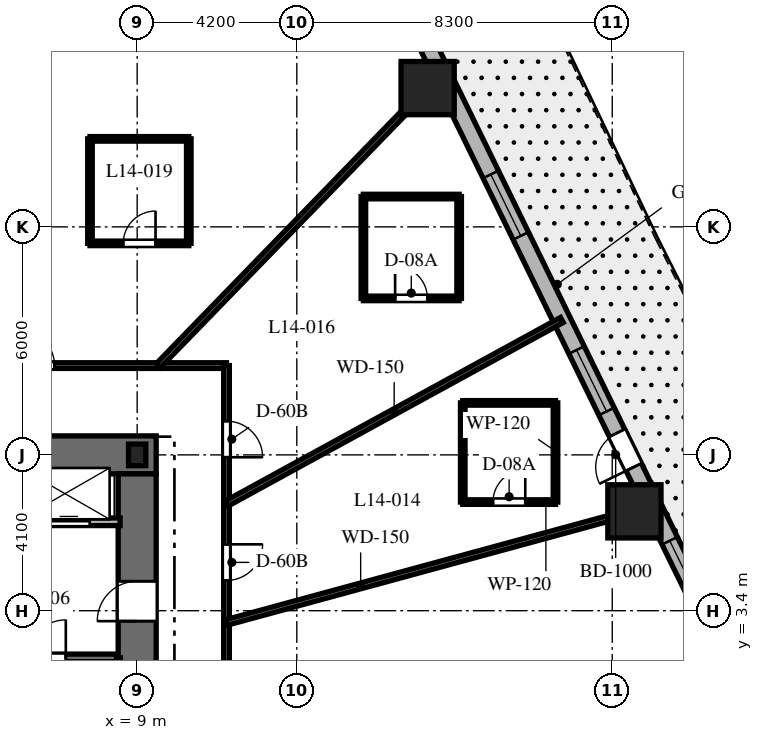
"""IFC4 building model, lengths in metres.
Left out: names, types, materials, properties, quantities, classifications, styles, units other than length and angle.
Written with IfcOpenShell. Run it as: python <this file> out.ifc"""

import sys

from ifc_helpers import new_model, si_unit, direction, frame, frame_2d, origin, origin_2d, place, context, subcontext, project, spatial, rectangle, i_section, extrude, element, fill, save


model = new_model("IFC4")
c1 = context("Model", 3, precision=1e-05, world=origin(), true_north=direction((0.0, 1.0)))
c2 = subcontext(c1, "Body", "Model", "MODEL_VIEW")
j1 = project(units=[si_unit("LENGTHUNIT", "METRE"), si_unit("PLANEANGLEUNIT", "RADIAN")], contexts=[c1])
p1 = place(None, origin())
s1 = spatial("IfcSite", under=j1, at=p1, CompositionType="ELEMENT")
p2 = place(p1, origin())
s2 = spatial("IfcBuilding", under=s1, at=p2, CompositionType="ELEMENT")
p3 = place(p2, frame((0.0, 0.0, 63.8)))
s3 = spatial("IfcBuildingStorey", under=s2, at=p3, CompositionType="ELEMENT", Elevation=63.8)
p4 = place(p3, frame((1.85, 7.5, 0.0), z_axis=(0.0, 0.0, 1.0), x_axis=(1.0, 0.0, 0.0)))
e1 = element("IfcWall", 1, at=p4, inside=s3, PredefinedType="SHEAR", context=c2, shape_type="SweptSolid", body=[
    extrude(rectangle(XDim=7.65, YDim=1.0, at=frame_2d((3.825, 0.0))), origin(), (0.0, 0.0, 1.0), 3.7),
])
p5 = place(p3, frame((9.0, -7.0, 0.0), z_axis=(0.0, 0.0, 1.0), x_axis=(0.0, 1.0, 0.0)))
e2 = element("IfcWall", 2, at=p5, inside=s3, PredefinedType="SHEAR", context=c2, shape_type="SweptSolid", body=[
    extrude(rectangle(XDim=14.0, YDim=1.0, at=frame_2d((7.0, 0.0))), origin(), (0.0, 0.0, 1.0), 3.7),
])
p6 = place(p5, frame((10.125, 0.0, 0.0)))
e3 = element("IfcOpeningElement", 3, at=p6, cuts=e2, PredefinedType="OPENING", context=c2, shape_type="SweptSolid", body=[
    extrude(rectangle(XDim=1.05, YDim=2.15, at=frame_2d((0.525, 1.075))), frame((0.0, 0.51, 0.0), z_axis=(0.0, -1.0, 0.0), x_axis=(1.0, 0.0, 0.0)), (0.0, 0.0, 1.0), 1.02),
])
p7 = place(p3, frame((8.458, -6.985, 0.0), z_axis=(0.0, 0.0, 1.0), x_axis=(0.0, 1.0, 0.0)))
e4 = element("IfcWall", 4, at=p7, inside=s3, PredefinedType="SHEAR", context=c2, shape_type="SweptSolid", body=[
    extrude(rectangle(XDim=9.143, YDim=0.2, at=frame_2d((4.572, 0.0))), origin(), (0.0, 0.0, 1.0), 3.7),
])
p8 = place(p3, frame((4.772, 2.158, 0.0), z_axis=(0.0, 0.0, 1.0), x_axis=(1.0, 0.0, 0.0)))
e5 = element("IfcWall", 5, at=p8, inside=s3, PredefinedType="SHEAR", context=c2, shape_type="SweptSolid", body=[
    extrude(rectangle(XDim=3.686, YDim=0.2, at=frame_2d((1.843, 0.0))), origin(), (0.0, 0.0, 1.0), 3.7),
])
p9 = place(p8, frame((1.35, 0.0, 0.0)))
e6 = element("IfcOpeningElement", 6, at=p9, cuts=e5, PredefinedType="OPENING", context=c2, shape_type="SweptSolid", body=[
    extrude(rectangle(XDim=1.0, YDim=2.15, at=frame_2d((0.5, 1.075))), frame((0.0, 0.11, 0.0), z_axis=(0.0, -1.0, 0.0), x_axis=(1.0, 0.0, 0.0)), (0.0, 0.0, 1.0), 0.22),
])
p10 = place(p3, frame((9.0, 7.5, 0.0), z_axis=(0.0, 0.0, 1.0), x_axis=(1.0, 0.0, 0.0)))
e7 = element("IfcColumn", 7, at=p10, inside=s3, PredefinedType="COLUMN", context=c2, shape_type="SweptSolid", body=[
    extrude(i_section(OverallWidth=0.454, OverallDepth=0.569, WebThickness=0.078, FlangeThickness=0.125, at=origin_2d()), origin(), (0.0, 0.0, 1.0), 3.7),
])
for number, where, z_axis, x_axis in (
    (8, (22.084, 6.014, 0.0), (0.0, 0.0, 1.0), (1.0, 0.0, 0.0)),
    (9, (16.643, 17.152, 0.0), (0.0, 0.0, 1.0), (1.0, 0.0, 0.0)),
):
    element("IfcColumn", number, at=place(p3, frame(where, z_axis=z_axis, x_axis=x_axis)), inside=s3, PredefinedType="COLUMN", context=c2, shape_type="SweptSolid", body=[
        extrude(rectangle(XDim=1.4, YDim=1.4, at=origin_2d()), origin(), (0.0, 0.0, 1.0), 3.7),
    ])
p11 = place(p3, frame((24.336, 2.532, 0.0), z_axis=(0.0, 0.0, 1.0), x_axis=(-0.438931326393, 0.898520612291, 0.0)))
e10 = element("IfcWall", 10, at=p11, inside=s3, PredefinedType="SOLIDWALL", context=c2, shape_type="SweptSolid", body=[
    extrude(rectangle(XDim=20.623, YDim=0.45, at=frame_2d((10.312, 0.0))), origin(), (0.0, 0.0, 1.0), 3.4),
])
p12 = place(p11, frame((5.171, 0.0, 0.0)))
e11 = element("IfcOpeningElement", 11, at=p12, cuts=e10, PredefinedType="OPENING", context=c2, shape_type="SweptSolid", body=[
    extrude(rectangle(XDim=1.0, YDim=2.15, at=frame_2d((0.5, 1.075))), frame((0.0, 0.235, 0.0), z_axis=(0.0, -1.0, 0.0), x_axis=(1.0, 0.0, 0.0)), (0.0, 0.0, 1.0), 0.47),
])
p13 = place(p11, frame((6.8, 0.0, 0.8)))
e12 = element("IfcOpeningElement", 12, at=p13, cuts=e10, PredefinedType="OPENING", context=c2, shape_type="SweptSolid", body=[
    extrude(rectangle(XDim=1.8, YDim=1.8, at=frame_2d((0.9, 0.9))), frame((0.0, 0.235, 0.0), z_axis=(0.0, -1.0, 0.0), x_axis=(1.0, 0.0, 0.0)), (0.0, 0.0, 1.0), 0.47),
])
p14 = place(p11, frame((11.942, 0.0, 0.8)))
e13 = element("IfcOpeningElement", 13, at=p14, cuts=e10, PredefinedType="OPENING", context=c2, shape_type="SweptSolid", body=[
    extrude(rectangle(XDim=1.8, YDim=1.8, at=frame_2d((0.9, 0.9))), frame((0.0, 0.235, 0.0), z_axis=(0.0, -1.0, 0.0), x_axis=(1.0, 0.0, 0.0)), (0.0, 0.0, 1.0), 0.47),
])
p15 = place(p11, frame((17.66, 0.0, 0.8)))
e14 = element("IfcOpeningElement", 14, at=p15, cuts=e10, PredefinedType="OPENING", context=c2, shape_type="SweptSolid", body=[
    extrude(rectangle(XDim=1.8, YDim=1.8, at=frame_2d((0.9, 0.9))), frame((0.0, 0.235, 0.0), z_axis=(0.0, -1.0, 0.0), x_axis=(1.0, 0.0, 0.0)), (0.0, 0.0, 1.0), 0.47),
])
p16 = place(p11, frame((1.214, 0.0, 0.8)))
e15 = element("IfcOpeningElement", 15, at=p16, cuts=e10, PredefinedType="OPENING", context=c2, shape_type="SweptSolid", body=[
    extrude(rectangle(XDim=1.8, YDim=1.8, at=frame_2d((0.9, 0.9))), frame((0.0, 0.235, 0.0), z_axis=(0.0, -1.0, 0.0), x_axis=(1.0, 0.0, 0.0)), (0.0, 0.0, 1.0), 0.47),
])
p17 = place(p3, frame((4.5, 5.74, 0.0), z_axis=(0.0, 0.0, 1.0), x_axis=(1.0, 0.0, 0.0)))
e16 = element("IfcWall", 16, at=p17, inside=s3, PredefinedType="PARTITIONING", context=c2, shape_type="SweptSolid", body=[
    extrude(rectangle(XDim=4.05, YDim=0.2, at=frame_2d((2.025, 0.0))), origin(), (0.0, 0.0, 1.0), 3.4),
])
p18 = place(p17, frame((0.3, 0.0, 0.0)))
e17 = element("IfcOpeningElement", 17, at=p18, cuts=e16, PredefinedType="OPENING", context=c2, shape_type="SweptSolid", body=[
    extrude(rectangle(XDim=0.85, YDim=2.03, at=frame_2d((0.425, 1.015))), frame((0.0, 0.11, 0.0), z_axis=(0.0, -1.0, 0.0), x_axis=(1.0, 0.0, 0.0)), (0.0, 0.0, 1.0), 0.22),
])
p19 = place(p17, frame((2.15, 0.0, 0.0)))
e18 = element("IfcOpeningElement", 18, at=p19, cuts=e16, PredefinedType="OPENING", context=c2, shape_type="SweptSolid", body=[
    extrude(rectangle(XDim=1.1, YDim=2.2, at=frame_2d((0.55, 1.1))), frame((0.0, 0.11, 0.0), z_axis=(0.0, -1.0, 0.0), x_axis=(1.0, 0.0, 0.0)), (0.0, 0.0, 1.0), 0.22),
])
p20 = place(p3, frame((-11.35, 9.85, 0.0), z_axis=(0.0, 0.0, 1.0), x_axis=(1.0, 0.0, 0.0)))
e19 = element("IfcWall", 19, at=p20, inside=s3, PredefinedType="PARTITIONING", context=c2, shape_type="SweptSolid", body=[
    extrude(rectangle(XDim=22.7, YDim=0.15, at=frame_2d((11.35, 0.0))), origin(), (0.0, 0.0, 1.0), 2.84),
])
p21 = place(p20, frame((17.225, 0.0, 0.0)))
e20 = element("IfcOpeningElement", 20, at=p21, cuts=e19, PredefinedType="OPENING", context=c2, shape_type="SweptSolid", body=[
    extrude(rectangle(XDim=0.95, YDim=2.03, at=frame_2d((0.475, 1.015))), frame((0.0, 0.085, 0.0), z_axis=(0.0, -1.0, 0.0), x_axis=(1.0, 0.0, 0.0)), (0.0, 0.0, 1.0), 0.17),
])
p22 = place(p20, frame((10.444, 0.0, 0.0)))
e21 = element("IfcOpeningElement", 21, at=p22, cuts=e19, PredefinedType="OPENING", context=c2, shape_type="SweptSolid", body=[
    extrude(rectangle(XDim=0.95, YDim=2.03, at=frame_2d((0.475, 1.015))), frame((0.0, 0.085, 0.0), z_axis=(0.0, -1.0, 0.0), x_axis=(1.0, 0.0, 0.0)), (0.0, 0.0, 1.0), 0.17),
])
p23 = place(p20, frame((3.369, 0.0, 0.0)))
e22 = element("IfcOpeningElement", 22, at=p23, cuts=e19, PredefinedType="OPENING", context=c2, shape_type="SweptSolid", body=[
    extrude(rectangle(XDim=0.95, YDim=2.03, at=frame_2d((0.475, 1.015))), frame((0.0, 0.085, 0.0), z_axis=(0.0, -1.0, 0.0), x_axis=(1.0, 0.0, 0.0)), (0.0, 0.0, 1.0), 0.17),
])
p24 = place(p3, frame((11.35, 9.85, 0.0), z_axis=(0.0, 0.0, 1.0), x_axis=(0.0, -1.0, 0.0)))
e23 = element("IfcWall", 23, at=p24, inside=s3, PredefinedType="PARTITIONING", context=c2, shape_type="SweptSolid", body=[
    extrude(rectangle(XDim=19.7, YDim=0.15, at=frame_2d((9.85, 0.0))), origin(), (0.0, 0.0, 1.0), 2.84),
])
p25 = place(p24, frame((4.704, 0.0, 0.0)))
e24 = element("IfcOpeningElement", 24, at=p25, cuts=e23, PredefinedType="OPENING", context=c2, shape_type="SweptSolid", body=[
    extrude(rectangle(XDim=0.95, YDim=2.03, at=frame_2d((0.475, 1.015))), frame((0.0, 0.085, 0.0), z_axis=(0.0, -1.0, 0.0), x_axis=(1.0, 0.0, 0.0)), (0.0, 0.0, 1.0), 0.17),
])
p26 = place(p24, frame((1.462, 0.0, 0.0)))
e25 = element("IfcOpeningElement", 25, at=p26, cuts=e23, PredefinedType="OPENING", context=c2, shape_type="SweptSolid", body=[
    extrude(rectangle(XDim=0.95, YDim=2.03, at=frame_2d((0.475, 1.015))), frame((0.0, 0.085, 0.0), z_axis=(0.0, -1.0, 0.0), x_axis=(1.0, 0.0, 0.0)), (0.0, 0.0, 1.0), 0.17),
])
p27 = place(p24, frame((15.191, 0.0, 0.0)))
e26 = element("IfcOpeningElement", 26, at=p27, cuts=e23, PredefinedType="OPENING", context=c2, shape_type="SweptSolid", body=[
    extrude(rectangle(XDim=0.95, YDim=2.03, at=frame_2d((0.475, 1.015))), frame((0.0, 0.085, 0.0), z_axis=(0.0, -1.0, 0.0), x_axis=(1.0, 0.0, 0.0)), (0.0, 0.0, 1.0), 0.17),
])
p28 = place(p24, frame((8.838, 0.0, 0.0)))
e27 = element("IfcOpeningElement", 27, at=p28, cuts=e23, PredefinedType="OPENING", context=c2, shape_type="SweptSolid", body=[
    extrude(rectangle(XDim=0.95, YDim=2.03, at=frame_2d((0.475, 1.015))), frame((0.0, 0.085, 0.0), z_axis=(0.0, -1.0, 0.0), x_axis=(1.0, 0.0, 0.0)), (0.0, 0.0, 1.0), 0.17),
])
p29 = place(p3, frame((11.35, 3.091, 0.0), z_axis=(0.0, 0.0, 1.0), x_axis=(0.964859685283, 0.262765651704, 0.0)))
e28 = element("IfcWall", 28, at=p29, inside=s3, PredefinedType="PARTITIONING", context=c2, shape_type="SweptSolid", body=[
    extrude(rectangle(XDim=11.629, YDim=0.15, at=frame_2d((5.814, 0.0))), origin(), (0.0, 0.0, 1.0), 2.54),
])
p30 = place(p3, frame((11.35, 6.217, 0.0), z_axis=(0.0, 0.0, 1.0), x_axis=(0.877047587135, 0.480403507378, 0.0)))
e29 = element("IfcWall", 29, at=p30, inside=s3, PredefinedType="PARTITIONING", context=c2, shape_type="SweptSolid", body=[
    extrude(rectangle(XDim=10.062, YDim=0.15, at=frame_2d((5.031, 0.0))), origin(), (0.0, 0.0, 1.0), 2.54),
])
p31 = place(p3, frame((9.558, 9.85, 0.0), z_axis=(0.0, 0.0, 1.0), x_axis=(0.69638346089, 0.717669893056, 0.0)))
e30 = element("IfcWall", 30, at=p31, inside=s3, PredefinedType="PARTITIONING", context=c2, shape_type="SweptSolid", body=[
    extrude(rectangle(XDim=10.701, YDim=0.15, at=frame_2d((5.351, 0.0))), origin(), (0.0, 0.0, 1.0), 2.54),
])
p32 = place(p3, frame((3.048, 9.85, 0.0), z_axis=(0.0, 0.0, 1.0), x_axis=(0.295553992761, 0.955326037206, 0.0)))
e31 = element("IfcWall", 31, at=p32, inside=s3, PredefinedType="PARTITIONING", context=c2, shape_type="SweptSolid", body=[
    extrude(rectangle(XDim=13.739, YDim=0.15, at=frame_2d((6.869, 0.0))), origin(), (0.0, 0.0, 1.0), 2.54),
])
p33 = place(p3, frame((17.567, 6.258, 0.0), z_axis=(0.0, 0.0, 1.0), x_axis=(1.0, 0.0, 0.0)))
e32 = element("IfcWall", 32, at=p33, inside=s3, PredefinedType="PARTITIONING", context=c2, shape_type="SweptSolid", body=[
    extrude(rectangle(XDim=2.44, YDim=0.12, at=frame_2d((1.22, 0.0))), origin(), (0.0, 0.0, 1.0), 2.84),
])
p34 = place(p33, frame((0.795, 0.0, 0.0)))
e33 = element("IfcOpeningElement", 33, at=p34, cuts=e32, PredefinedType="OPENING", context=c2, shape_type="SweptSolid", body=[
    extrude(rectangle(XDim=0.85, YDim=2.03, at=frame_2d((0.425, 1.015))), frame((0.0, 0.07, 0.0), z_axis=(0.0, -1.0, 0.0), x_axis=(1.0, 0.0, 0.0)), (0.0, 0.0, 1.0), 0.14),
])
p35 = place(p3, frame((20.007, 6.258, 0.0), z_axis=(0.0, 0.0, 1.0), x_axis=(0.0, 1.0, 0.0)))
e34 = element("IfcWall", 34, at=p35, inside=s3, PredefinedType="PARTITIONING", context=c2, shape_type="SweptSolid", body=[
    extrude(rectangle(XDim=2.61, YDim=0.12, at=frame_2d((1.305, 0.0))), origin(), (0.0, 0.0, 1.0), 2.84),
])
p36 = place(p3, frame((20.007, 8.868, 0.0), z_axis=(0.0, 0.0, 1.0), x_axis=(-1.0, 0.0, 0.0)))
e35 = element("IfcWall", 35, at=p36, inside=s3, PredefinedType="PARTITIONING", context=c2, shape_type="SweptSolid", body=[
    extrude(rectangle(XDim=2.44, YDim=0.12, at=frame_2d((1.22, 0.0))), origin(), (0.0, 0.0, 1.0), 3.4),
])
p37 = place(p3, frame((17.567, 8.868, 0.0), z_axis=(0.0, 0.0, 1.0), x_axis=(0.0, -1.0, 0.0)))
e36 = element("IfcWall", 36, at=p37, inside=s3, PredefinedType="PARTITIONING", context=c2, shape_type="SweptSolid", body=[
    extrude(rectangle(XDim=2.61, YDim=0.12, at=frame_2d((1.305, 0.0))), origin(), (0.0, 0.0, 1.0), 2.84),
])
p38 = place(p3, frame((14.952, 11.618, 0.0), z_axis=(0.0, 0.0, 1.0), x_axis=(1.0, 0.0, 0.0)))
e37 = element("IfcWall", 37, at=p38, inside=s3, PredefinedType="PARTITIONING", context=c2, shape_type="SweptSolid", body=[
    extrude(rectangle(XDim=2.52, YDim=0.12, at=frame_2d((1.26, 0.0))), origin(), (0.0, 0.0, 1.0), 2.927),
])
p39 = place(p38, frame((0.835, 0.0, 0.0)))
e38 = element("IfcOpeningElement", 38, at=p39, cuts=e37, PredefinedType="OPENING", context=c2, shape_type="SweptSolid", body=[
    extrude(rectangle(XDim=0.85, YDim=2.03, at=frame_2d((0.425, 1.015))), frame((0.0, 0.07, 0.0), z_axis=(0.0, -1.0, 0.0), x_axis=(1.0, 0.0, 0.0)), (0.0, 0.0, 1.0), 0.14),
])
p40 = place(p3, frame((17.472, 11.618, 0.0), z_axis=(0.0, 0.0, 1.0), x_axis=(0.0, 1.0, 0.0)))
e39 = element("IfcWall", 39, at=p40, inside=s3, PredefinedType="PARTITIONING", context=c2, shape_type="SweptSolid", body=[
    extrude(rectangle(XDim=2.68, YDim=0.12, at=frame_2d((1.34, 0.0))), origin(), (0.0, 0.0, 1.0), 3.4),
])
p41 = place(p3, frame((17.472, 14.298, 0.0), z_axis=(0.0, 0.0, 1.0), x_axis=(-1.0, 0.0, 0.0)))
e40 = element("IfcWall", 40, at=p41, inside=s3, PredefinedType="PARTITIONING", context=c2, shape_type="SweptSolid", body=[
    extrude(rectangle(XDim=2.52, YDim=0.12, at=frame_2d((1.26, 0.0))), origin(), (0.0, 0.0, 1.0), 3.4),
])
p42 = place(p3, frame((14.952, 14.298, 0.0), z_axis=(0.0, 0.0, 1.0), x_axis=(0.0, -1.0, 0.0)))
e41 = element("IfcWall", 41, at=p42, inside=s3, PredefinedType="PARTITIONING", context=c2, shape_type="SweptSolid", body=[
    extrude(rectangle(XDim=2.68, YDim=0.12, at=frame_2d((1.34, 0.0))), origin(), (0.0, 0.0, 1.0), 2.927),
])
p43 = place(p3, frame((7.758, 13.066, 0.0), z_axis=(0.0, 0.0, 1.0), x_axis=(1.0, 0.0, 0.0)))
e42 = element("IfcWall", 42, at=p43, inside=s3, PredefinedType="PARTITIONING", context=c2, shape_type="SweptSolid", body=[
    extrude(rectangle(XDim=2.6, YDim=0.12, at=frame_2d((1.3, 0.0))), origin(), (0.0, 0.0, 1.0), 2.84),
])
p44 = place(p43, frame((0.875, 0.0, 0.0)))
e43 = element("IfcOpeningElement", 43, at=p44, cuts=e42, PredefinedType="OPENING", context=c2, shape_type="SweptSolid", body=[
    extrude(rectangle(XDim=0.85, YDim=2.03, at=frame_2d((0.425, 1.015))), frame((0.0, 0.07, 0.0), z_axis=(0.0, -1.0, 0.0), x_axis=(1.0, 0.0, 0.0)), (0.0, 0.0, 1.0), 0.14),
])
p45 = place(p3, frame((10.358, 13.066, 0.0), z_axis=(0.0, 0.0, 1.0), x_axis=(0.0, 1.0, 0.0)))
e44 = element("IfcWall", 44, at=p45, inside=s3, PredefinedType="PARTITIONING", context=c2, shape_type="SweptSolid", body=[
    extrude(rectangle(XDim=2.75, YDim=0.12, at=frame_2d((1.375, 0.0))), origin(), (0.0, 0.0, 1.0), 3.4),
])
p46 = place(p3, frame((10.358, 15.816, 0.0), z_axis=(0.0, 0.0, 1.0), x_axis=(-1.0, 0.0, 0.0)))
e45 = element("IfcWall", 45, at=p46, inside=s3, PredefinedType="PARTITIONING", context=c2, shape_type="SweptSolid", body=[
    extrude(rectangle(XDim=2.6, YDim=0.12, at=frame_2d((1.3, 0.0))), origin(), (0.0, 0.0, 1.0), 2.84),
])
p47 = place(p3, frame((7.758, 15.816, 0.0), z_axis=(0.0, 0.0, 1.0), x_axis=(0.0, -1.0, 0.0)))
e46 = element("IfcWall", 46, at=p47, inside=s3, PredefinedType="PARTITIONING", context=c2, shape_type="SweptSolid", body=[
    extrude(rectangle(XDim=2.75, YDim=0.12, at=frame_2d((1.375, 0.0))), origin(), (0.0, 0.0, 1.0), 2.84),
])
p48 = place(p12, origin())
e47 = element("IfcDoor", 47, at=p48, inside=s3, OperationType="SINGLE_SWING_LEFT", PredefinedType="DOOR", context=c2, shape_type="SweptSolid", body=[
    extrude(rectangle(XDim=1.0, YDim=2.15, at=frame_2d((0.5, 1.075))), frame((0.0, 0.025, 0.0), z_axis=(0.0, -1.0, 0.0), x_axis=(1.0, 0.0, 0.0)), (0.0, 0.0, 1.0), 0.05),
])
fill(e11, e47)
p49 = place(p13, origin())
e48 = element("IfcWindow", 48, at=p49, inside=s3, PartitioningType="SINGLE_PANEL", PredefinedType="WINDOW", context=c2, shape_type="SweptSolid", body=[
    extrude(rectangle(XDim=1.8, YDim=1.8, at=frame_2d((0.9, 0.9))), frame((0.0, 0.03, 0.0), z_axis=(0.0, -1.0, 0.0), x_axis=(1.0, 0.0, 0.0)), (0.0, 0.0, 1.0), 0.06),
])
fill(e12, e48)
p50 = place(p14, origin())
e49 = element("IfcWindow", 49, at=p50, inside=s3, PartitioningType="SINGLE_PANEL", PredefinedType="WINDOW", context=c2, shape_type="SweptSolid", body=[
    extrude(rectangle(XDim=1.8, YDim=1.8, at=frame_2d((0.9, 0.9))), frame((0.0, 0.03, 0.0), z_axis=(0.0, -1.0, 0.0), x_axis=(1.0, 0.0, 0.0)), (0.0, 0.0, 1.0), 0.06),
])
fill(e13, e49)
p51 = place(p16, origin())
e50 = element("IfcWindow", 50, at=p51, inside=s3, PartitioningType="SINGLE_PANEL", PredefinedType="WINDOW", context=c2, shape_type="SweptSolid", body=[
    extrude(rectangle(XDim=1.8, YDim=1.8, at=frame_2d((0.9, 0.9))), frame((0.0, 0.03, 0.0), z_axis=(0.0, -1.0, 0.0), x_axis=(1.0, 0.0, 0.0)), (0.0, 0.0, 1.0), 0.06),
])
fill(e15, e50)
p52 = place(p9, origin())
e51 = element("IfcDoor", 51, at=p52, inside=s3, OperationType="SINGLE_SWING_RIGHT", PredefinedType="DOOR", context=c2, shape_type="SweptSolid", body=[
    extrude(rectangle(XDim=1.0, YDim=2.15, at=frame_2d((0.5, 1.075))), frame((0.0, 0.025, 0.0), z_axis=(0.0, -1.0, 0.0), x_axis=(1.0, 0.0, 0.0)), (0.0, 0.0, 1.0), 0.05),
])
fill(e6, e51)
p53 = place(p6, origin())
e52 = element("IfcDoor", 52, at=p53, inside=s3, OperationType="SINGLE_SWING_LEFT", PredefinedType="DOOR", context=c2, shape_type="SweptSolid", body=[
    extrude(rectangle(XDim=1.05, YDim=2.15, at=frame_2d((0.525, 1.075))), frame((0.0, 0.025, 0.0), z_axis=(0.0, -1.0, 0.0), x_axis=(1.0, 0.0, 0.0)), (0.0, 0.0, 1.0), 0.05),
])
fill(e3, e52)
p54 = place(p19, origin())
e53 = element("IfcDoor", 53, at=p54, inside=s3, OperationType="SLIDING_TO_RIGHT", PredefinedType="DOOR", context=c2, shape_type="SweptSolid", body=[
    extrude(rectangle(XDim=1.1, YDim=2.2, at=frame_2d((0.55, 1.1))), frame((0.0, 0.025, 0.0), z_axis=(0.0, -1.0, 0.0), x_axis=(1.0, 0.0, 0.0)), (0.0, 0.0, 1.0), 0.05),
])
fill(e18, e53)
p55 = place(p25, origin())
e54 = element("IfcDoor", 54, at=p55, inside=s3, OperationType="SINGLE_SWING_LEFT", PredefinedType="DOOR", context=c2, shape_type="SweptSolid", body=[
    extrude(rectangle(XDim=0.95, YDim=2.03, at=frame_2d((0.475, 1.015))), frame((0.0, 0.025, 0.0), z_axis=(0.0, -1.0, 0.0), x_axis=(1.0, 0.0, 0.0)), (0.0, 0.0, 1.0), 0.05),
])
fill(e24, e54)
p56 = place(p34, origin())
e55 = element("IfcDoor", 55, at=p56, inside=s3, OperationType="SINGLE_SWING_RIGHT", PredefinedType="DOOR", context=c2, shape_type="SweptSolid", body=[
    extrude(rectangle(XDim=0.85, YDim=2.03, at=frame_2d((0.425, 1.015))), frame((0.0, 0.025, 0.0), z_axis=(0.0, -1.0, 0.0), x_axis=(1.0, 0.0, 0.0)), (0.0, 0.0, 1.0), 0.05),
])
fill(e33, e55)
p57 = place(p26, origin())
e56 = element("IfcDoor", 56, at=p57, inside=s3, OperationType="SINGLE_SWING_RIGHT", PredefinedType="DOOR", context=c2, shape_type="SweptSolid", body=[
    extrude(rectangle(XDim=0.95, YDim=2.03, at=frame_2d((0.475, 1.015))), frame((0.0, 0.025, 0.0), z_axis=(0.0, -1.0, 0.0), x_axis=(1.0, 0.0, 0.0)), (0.0, 0.0, 1.0), 0.05),
])
fill(e25, e56)
p58 = place(p39, origin())
e57 = element("IfcDoor", 57, at=p58, inside=s3, OperationType="SINGLE_SWING_LEFT", PredefinedType="DOOR", context=c2, shape_type="SweptSolid", body=[
    extrude(rectangle(XDim=0.85, YDim=2.03, at=frame_2d((0.425, 1.015))), frame((0.0, 0.025, 0.0), z_axis=(0.0, -1.0, 0.0), x_axis=(1.0, 0.0, 0.0)), (0.0, 0.0, 1.0), 0.05),
])
fill(e38, e57)
p59 = place(p21, origin())
e58 = element("IfcDoor", 58, at=p59, inside=s3, OperationType="SINGLE_SWING_LEFT", PredefinedType="DOOR", context=c2, shape_type="SweptSolid", body=[
    extrude(rectangle(XDim=0.95, YDim=2.03, at=frame_2d((0.475, 1.015))), frame((0.0, 0.025, 0.0), z_axis=(0.0, -1.0, 0.0), x_axis=(1.0, 0.0, 0.0)), (0.0, 0.0, 1.0), 0.05),
])
fill(e20, e58)
p60 = place(p44, origin())
e59 = element("IfcDoor", 59, at=p60, inside=s3, OperationType="SINGLE_SWING_RIGHT", PredefinedType="DOOR", context=c2, shape_type="SweptSolid", body=[
    extrude(rectangle(XDim=0.85, YDim=2.03, at=frame_2d((0.425, 1.015))), frame((0.0, 0.025, 0.0), z_axis=(0.0, -1.0, 0.0), x_axis=(1.0, 0.0, 0.0)), (0.0, 0.0, 1.0), 0.05),
])
fill(e43, e59)
save(model, sys.argv[1])
